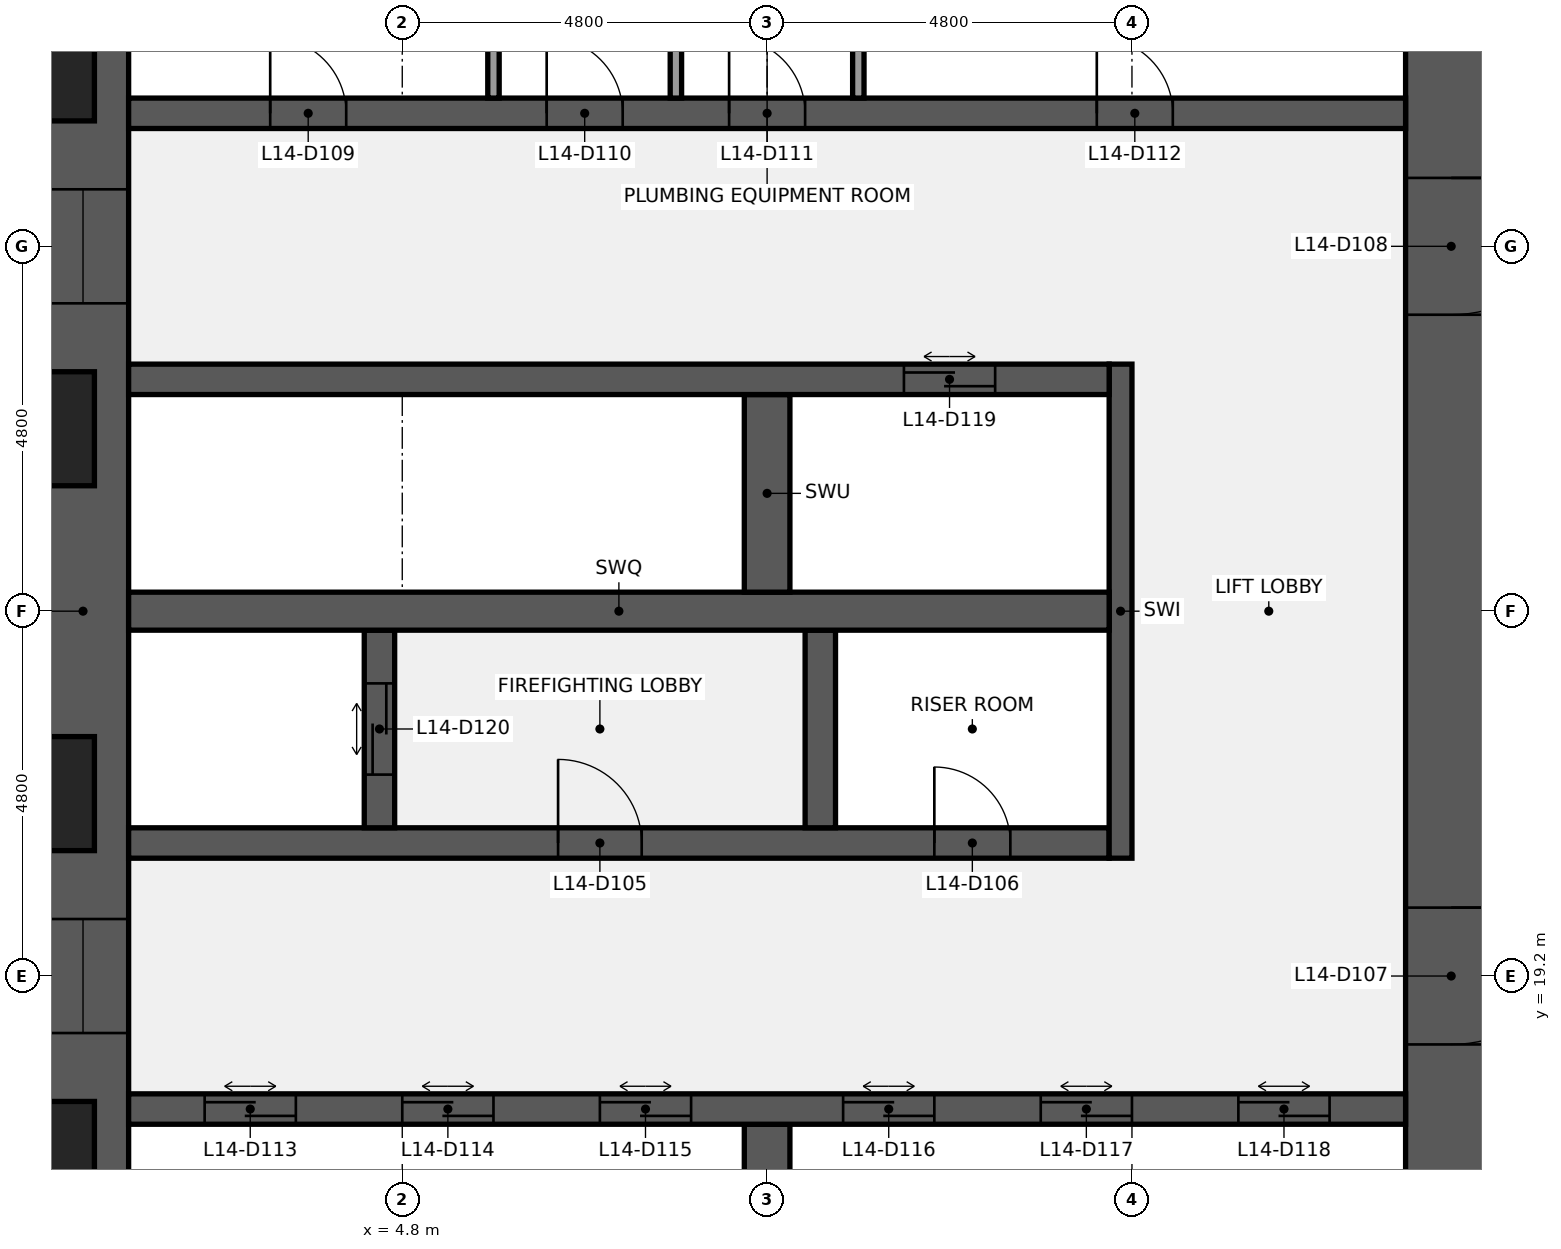
"""IFC4 building model, lengths in metres.
Left out: names, types, materials, properties, quantities, classifications, styles, units other than length and angle.
Written with IfcOpenShell. Run it as: python <this file> out.ifc"""

import sys

from ifc_helpers import new_model, si_unit, direction, frame, frame_2d, origin, place, context, subcontext, project, spatial, rectangle, extrude, element, fill, save


model = new_model("IFC4")
c1 = context("Model", 3, precision=1e-05, world=origin(), true_north=direction((0.0, 1.0)))
c2 = subcontext(c1, "Body", "Model", "MODEL_VIEW")
j1 = project(units=[si_unit("LENGTHUNIT", "METRE"), si_unit("PLANEANGLEUNIT", "RADIAN")], contexts=[c1])
p1 = place(None, origin())
s1 = spatial("IfcSite", under=j1, at=p1, CompositionType="ELEMENT")
p2 = place(p1, origin())
s2 = spatial("IfcBuilding", under=s1, at=p2, CompositionType="ELEMENT")
p3 = place(p2, frame((0.0, 0.0, 67.0)))
s3 = spatial("IfcBuildingStorey", under=s2, at=p3, CompositionType="ELEMENT", Elevation=67.0)
p4 = place(p3, frame((0.6, 9.6, 0.0), z_axis=(0.0, 0.0, 1.0), x_axis=(0.0, 1.0, 0.0)))
e1 = element("IfcWall", 1, at=p4, inside=s3, PredefinedType="SHEAR", context=c2, shape_type="SweptSolid", body=[
    extrude(rectangle(XDim=28.8, YDim=1.2, at=frame_2d((14.4, 0.0))), origin(), (0.0, 0.0, 1.0), 3.84),
])
p5 = place(p4, frame((8.85, 0.0, 0.9)))
e2 = element("IfcOpeningElement", 2, at=p5, cuts=e1, PredefinedType="OPENING", context=c2, shape_type="SweptSolid", body=[
    extrude(rectangle(XDim=1.5, YDim=1.5, at=frame_2d((0.75, 0.75))), frame((0.0, 0.61, 0.0), z_axis=(0.0, -1.0, 0.0), x_axis=(1.0, 0.0, 0.0)), (0.0, 0.0, 1.0), 1.22),
])
p6 = place(p4, frame((18.45, 0.0, 0.9)))
e3 = element("IfcOpeningElement", 3, at=p6, cuts=e1, PredefinedType="OPENING", context=c2, shape_type="SweptSolid", body=[
    extrude(rectangle(XDim=1.5, YDim=1.5, at=frame_2d((0.75, 0.75))), frame((0.0, 0.61, 0.0), z_axis=(0.0, -1.0, 0.0), x_axis=(1.0, 0.0, 0.0)), (0.0, 0.0, 1.0), 1.22),
])
p7 = place(p3, frame((18.6, 38.4, 0.0), z_axis=(0.0, 0.0, 1.0), x_axis=(0.0, -1.0, 0.0)))
e4 = element("IfcWall", 4, at=p7, inside=s3, PredefinedType="SHEAR", context=c2, shape_type="SweptSolid", body=[
    extrude(rectangle(XDim=28.8, YDim=1.2, at=frame_2d((14.4, 0.0))), origin(), (0.0, 0.0, 1.0), 3.84),
])
p8 = place(p7, frame((18.3, 0.0, 0.0)))
e5 = element("IfcOpeningElement", 5, at=p8, cuts=e4, PredefinedType="OPENING", context=c2, shape_type="SweptSolid", body=[
    extrude(rectangle(XDim=1.8, YDim=2.1, at=frame_2d((0.9, 1.05))), frame((0.0, 0.61, 0.0), z_axis=(0.0, -1.0, 0.0), x_axis=(1.0, 0.0, 0.0)), (0.0, 0.0, 1.0), 1.22),
])
p9 = place(p7, frame((8.7, 0.0, 0.0)))
e6 = element("IfcOpeningElement", 6, at=p9, cuts=e4, PredefinedType="OPENING", context=c2, shape_type="SweptSolid", body=[
    extrude(rectangle(XDim=1.8, YDim=2.1, at=frame_2d((0.9, 1.05))), frame((0.0, 0.61, 0.0), z_axis=(0.0, -1.0, 0.0), x_axis=(1.0, 0.0, 0.0)), (0.0, 0.0, 1.0), 1.22),
])
p10 = place(p3, frame((9.6, 14.65, 0.0), z_axis=(0.0, 0.0, 1.0), x_axis=(0.0, 1.0, 0.0)))
e7 = element("IfcWall", 7, at=p10, inside=s3, PredefinedType="SHEAR", context=c2, shape_type="SweptSolid", body=[
    extrude(rectangle(XDim=2.6, YDim=0.6, at=frame_2d((1.3, 0.0))), origin(), (0.0, 0.0, 1.0), 3.84),
])
p11 = place(p3, frame((1.2, 17.45, 0.0), z_axis=(0.0, 0.0, 1.0), x_axis=(1.0, 0.0, 0.0)))
e8 = element("IfcWall", 8, at=p11, inside=s3, PredefinedType="SHEAR", context=c2, shape_type="SweptSolid", body=[
    extrude(rectangle(XDim=16.8, YDim=0.4, at=frame_2d((8.4, 0.0))), origin(), (0.0, 0.0, 1.0), 3.84),
])
p12 = place(p11, frame((1.0, 0.0, 0.0)))
e9 = element("IfcOpeningElement", 9, at=p12, cuts=e8, PredefinedType="OPENING", context=c2, shape_type="SweptSolid", body=[
    extrude(rectangle(XDim=1.2, YDim=2.1, at=frame_2d((0.6, 1.05))), frame((0.0, 0.21, 0.0), z_axis=(0.0, -1.0, 0.0), x_axis=(1.0, 0.0, 0.0)), (0.0, 0.0, 1.0), 0.42),
])
p13 = place(p11, frame((3.6, 0.0, 0.0)))
e10 = element("IfcOpeningElement", 10, at=p13, cuts=e8, PredefinedType="OPENING", context=c2, shape_type="SweptSolid", body=[
    extrude(rectangle(XDim=1.2, YDim=2.1, at=frame_2d((0.6, 1.05))), frame((0.0, 0.21, 0.0), z_axis=(0.0, -1.0, 0.0), x_axis=(1.0, 0.0, 0.0)), (0.0, 0.0, 1.0), 0.42),
])
p14 = place(p11, frame((6.2, 0.0, 0.0)))
e11 = element("IfcOpeningElement", 11, at=p14, cuts=e8, PredefinedType="OPENING", context=c2, shape_type="SweptSolid", body=[
    extrude(rectangle(XDim=1.2, YDim=2.1, at=frame_2d((0.6, 1.05))), frame((0.0, 0.21, 0.0), z_axis=(0.0, -1.0, 0.0), x_axis=(1.0, 0.0, 0.0)), (0.0, 0.0, 1.0), 0.42),
])
p15 = place(p11, frame((9.4, 0.0, 0.0)))
e12 = element("IfcOpeningElement", 12, at=p15, cuts=e8, PredefinedType="OPENING", context=c2, shape_type="SweptSolid", body=[
    extrude(rectangle(XDim=1.2, YDim=2.1, at=frame_2d((0.6, 1.05))), frame((0.0, 0.21, 0.0), z_axis=(0.0, -1.0, 0.0), x_axis=(1.0, 0.0, 0.0)), (0.0, 0.0, 1.0), 0.42),
])
p16 = place(p11, frame((12.0, 0.0, 0.0)))
e13 = element("IfcOpeningElement", 13, at=p16, cuts=e8, PredefinedType="OPENING", context=c2, shape_type="SweptSolid", body=[
    extrude(rectangle(XDim=1.2, YDim=2.1, at=frame_2d((0.6, 1.05))), frame((0.0, 0.21, 0.0), z_axis=(0.0, -1.0, 0.0), x_axis=(1.0, 0.0, 0.0)), (0.0, 0.0, 1.0), 0.42),
])
p17 = place(p11, frame((14.6, 0.0, 0.0)))
e14 = element("IfcOpeningElement", 14, at=p17, cuts=e8, PredefinedType="OPENING", context=c2, shape_type="SweptSolid", body=[
    extrude(rectangle(XDim=1.2, YDim=2.1, at=frame_2d((0.6, 1.05))), frame((0.0, 0.21, 0.0), z_axis=(0.0, -1.0, 0.0), x_axis=(1.0, 0.0, 0.0)), (0.0, 0.0, 1.0), 0.42),
])
p18 = place(p3, frame((1.2, 20.95, 0.0), z_axis=(0.0, 0.0, 1.0), x_axis=(1.0, 0.0, 0.0)))
e15 = element("IfcWall", 15, at=p18, inside=s3, PredefinedType="SHEAR", context=c2, shape_type="SweptSolid", body=[
    extrude(rectangle(XDim=12.9, YDim=0.4, at=frame_2d((6.45, 0.0))), origin(), (0.0, 0.0, 1.0), 3.84),
])
p19 = place(p18, frame((5.65, 0.0, 0.0)))
e16 = element("IfcOpeningElement", 16, at=p19, cuts=e15, PredefinedType="OPENING", context=c2, shape_type="SweptSolid", body=[
    extrude(rectangle(XDim=1.1, YDim=2.1, at=frame_2d((0.55, 1.05))), frame((0.0, 0.21, 0.0), z_axis=(0.0, -1.0, 0.0), x_axis=(1.0, 0.0, 0.0)), (0.0, 0.0, 1.0), 0.42),
])
p20 = place(p18, frame((10.6, 0.0, 0.0)))
e17 = element("IfcOpeningElement", 17, at=p20, cuts=e15, PredefinedType="OPENING", context=c2, shape_type="SweptSolid", body=[
    extrude(rectangle(XDim=1.0, YDim=2.1, at=frame_2d((0.5, 1.05))), frame((0.0, 0.21, 0.0), z_axis=(0.0, -1.0, 0.0), x_axis=(1.0, 0.0, 0.0)), (0.0, 0.0, 1.0), 0.42),
])
p21 = place(p3, frame((14.25, 20.75, 0.0), z_axis=(0.0, 0.0, 1.0), x_axis=(0.0, 1.0, 0.0)))
e18 = element("IfcWall", 18, at=p21, inside=s3, PredefinedType="SHEAR", context=c2, shape_type="SweptSolid", body=[
    extrude(rectangle(XDim=6.5, YDim=0.3, at=frame_2d((3.25, 0.0))), origin(), (0.0, 0.0, 1.0), 3.84),
])
p22 = place(p3, frame((4.5, 21.15, 0.0), z_axis=(0.0, 0.0, 1.0), x_axis=(0.0, 1.0, 0.0)))
e19 = element("IfcWall", 19, at=p22, inside=s3, PredefinedType="SHEAR", context=c2, shape_type="SweptSolid", body=[
    extrude(rectangle(XDim=2.6, YDim=0.4, at=frame_2d((1.3, 0.0))), origin(), (0.0, 0.0, 1.0), 3.84),
])
p23 = place(p22, frame((0.7, 0.0, 0.0)))
e20 = element("IfcOpeningElement", 20, at=p23, cuts=e19, PredefinedType="OPENING", context=c2, shape_type="SweptSolid", body=[
    extrude(rectangle(XDim=1.2, YDim=2.1, at=frame_2d((0.6, 1.05))), frame((0.0, 0.21, 0.0), z_axis=(0.0, -1.0, 0.0), x_axis=(1.0, 0.0, 0.0)), (0.0, 0.0, 1.0), 0.42),
])
p24 = place(p3, frame((10.3, 21.15, 0.0), z_axis=(0.0, 0.0, 1.0), x_axis=(0.0, 1.0, 0.0)))
e21 = element("IfcWall", 21, at=p24, inside=s3, PredefinedType="SHEAR", context=c2, shape_type="SweptSolid", body=[
    extrude(rectangle(XDim=2.6, YDim=0.4, at=frame_2d((1.3, 0.0))), origin(), (0.0, 0.0, 1.0), 3.84),
])
p25 = place(p3, frame((1.2, 24.0, 0.0), z_axis=(0.0, 0.0, 1.0), x_axis=(1.0, 0.0, 0.0)))
e22 = element("IfcWall", 22, at=p25, inside=s3, PredefinedType="SHEAR", context=c2, shape_type="SweptSolid", body=[
    extrude(rectangle(XDim=12.9, YDim=0.5, at=frame_2d((6.45, 0.0))), origin(), (0.0, 0.0, 1.0), 3.84),
])
p26 = place(p3, frame((9.6, 24.25, 0.0), z_axis=(0.0, 0.0, 1.0), x_axis=(0.0, 1.0, 0.0)))
e23 = element("IfcWall", 23, at=p26, inside=s3, PredefinedType="SHEAR", context=c2, shape_type="SweptSolid", body=[
    extrude(rectangle(XDim=2.6, YDim=0.6, at=frame_2d((1.3, 0.0))), origin(), (0.0, 0.0, 1.0), 3.84),
])
p27 = place(p3, frame((1.2, 27.05, 0.0), z_axis=(0.0, 0.0, 1.0), x_axis=(1.0, 0.0, 0.0)))
e24 = element("IfcWall", 24, at=p27, inside=s3, PredefinedType="SHEAR", context=c2, shape_type="SweptSolid", body=[
    extrude(rectangle(XDim=12.9, YDim=0.4, at=frame_2d((6.45, 0.0))), origin(), (0.0, 0.0, 1.0), 3.84),
])
p28 = place(p27, frame((10.2, 0.0, 0.0)))
e25 = element("IfcOpeningElement", 25, at=p28, cuts=e24, PredefinedType="OPENING", context=c2, shape_type="SweptSolid", body=[
    extrude(rectangle(XDim=1.2, YDim=2.1, at=frame_2d((0.6, 1.05))), frame((0.0, 0.21, 0.0), z_axis=(0.0, -1.0, 0.0), x_axis=(1.0, 0.0, 0.0)), (0.0, 0.0, 1.0), 0.42),
])
p29 = place(p3, frame((1.2, 30.55, 0.0), z_axis=(0.0, 0.0, 1.0), x_axis=(1.0, 0.0, 0.0)))
e26 = element("IfcWall", 26, at=p29, inside=s3, PredefinedType="SHEAR", context=c2, shape_type="SweptSolid", body=[
    extrude(rectangle(XDim=16.8, YDim=0.4, at=frame_2d((8.4, 0.0))), origin(), (0.0, 0.0, 1.0), 3.84),
])
p30 = place(p29, frame((1.863, 0.0, 0.0)))
e27 = element("IfcOpeningElement", 27, at=p30, cuts=e26, PredefinedType="OPENING", context=c2, shape_type="SweptSolid", body=[
    extrude(rectangle(XDim=1.0, YDim=2.1, at=frame_2d((0.5, 1.05))), frame((0.0, 0.21, 0.0), z_axis=(0.0, -1.0, 0.0), x_axis=(1.0, 0.0, 0.0)), (0.0, 0.0, 1.0), 0.42),
])
p31 = place(p29, frame((5.5, 0.0, 0.0)))
e28 = element("IfcOpeningElement", 28, at=p31, cuts=e26, PredefinedType="OPENING", context=c2, shape_type="SweptSolid", body=[
    extrude(rectangle(XDim=1.0, YDim=2.1, at=frame_2d((0.5, 1.05))), frame((0.0, 0.21, 0.0), z_axis=(0.0, -1.0, 0.0), x_axis=(1.0, 0.0, 0.0)), (0.0, 0.0, 1.0), 0.42),
])
p32 = place(p29, frame((7.9, 0.0, 0.0)))
e29 = element("IfcOpeningElement", 29, at=p32, cuts=e26, PredefinedType="OPENING", context=c2, shape_type="SweptSolid", body=[
    extrude(rectangle(XDim=1.0, YDim=2.1, at=frame_2d((0.5, 1.05))), frame((0.0, 0.21, 0.0), z_axis=(0.0, -1.0, 0.0), x_axis=(1.0, 0.0, 0.0)), (0.0, 0.0, 1.0), 0.42),
])
p33 = place(p29, frame((12.738, 0.0, 0.0)))
e30 = element("IfcOpeningElement", 30, at=p33, cuts=e26, PredefinedType="OPENING", context=c2, shape_type="SweptSolid", body=[
    extrude(rectangle(XDim=1.0, YDim=2.1, at=frame_2d((0.5, 1.05))), frame((0.0, 0.21, 0.0), z_axis=(0.0, -1.0, 0.0), x_axis=(1.0, 0.0, 0.0)), (0.0, 0.0, 1.0), 0.42),
])
for number, where, z_axis, x_axis in (
    (31, (6.0, 30.75, 0.0), (0.0, 0.0, 1.0), (0.0, 1.0, 0.0)),
    (32, (8.4, 30.75, 0.0), (0.0, 0.0, 1.0), (0.0, 1.0, 0.0)),
    (33, (10.8, 30.75, 0.0), (0.0, 0.0, 1.0), (0.0, 1.0, 0.0)),
):
    element("IfcWall", number, at=place(p3, frame(where, z_axis=z_axis, x_axis=x_axis)), inside=s3, PredefinedType="PARTITIONING", context=c2, shape_type="SweptSolid", body=[
        extrude(rectangle(XDim=2.6, YDim=0.15, at=frame_2d((1.3, 0.0))), origin(), (0.0, 0.0, 1.0), 3.84),
    ])
p34 = place(p19, origin())
e34 = element("IfcDoor", 34, at=p34, inside=s3, OperationType="SINGLE_SWING_LEFT", PredefinedType="DOOR", context=c2, shape_type="SweptSolid", body=[
    extrude(rectangle(XDim=1.1, YDim=2.1, at=frame_2d((0.55, 1.05))), frame((0.0, 0.025, 0.0), z_axis=(0.0, -1.0, 0.0), x_axis=(1.0, 0.0, 0.0)), (0.0, 0.0, 1.0), 0.05),
])
fill(e16, e34)
p35 = place(p20, origin())
e35 = element("IfcDoor", 35, at=p35, inside=s3, OperationType="SINGLE_SWING_LEFT", PredefinedType="DOOR", context=c2, shape_type="SweptSolid", body=[
    extrude(rectangle(XDim=1.0, YDim=2.1, at=frame_2d((0.5, 1.05))), frame((0.0, 0.025, 0.0), z_axis=(0.0, -1.0, 0.0), x_axis=(1.0, 0.0, 0.0)), (0.0, 0.0, 1.0), 0.05),
])
fill(e17, e35)
p36 = place(p8, origin())
e36 = element("IfcDoor", 36, at=p36, inside=s3, OperationType="DOUBLE_DOOR_SINGLE_SWING", PredefinedType="DOOR", context=c2, shape_type="SweptSolid", body=[
    extrude(rectangle(XDim=1.8, YDim=2.1, at=frame_2d((0.9, 1.05))), frame((0.0, 0.025, 0.0), z_axis=(0.0, -1.0, 0.0), x_axis=(1.0, 0.0, 0.0)), (0.0, 0.0, 1.0), 0.05),
])
fill(e5, e36)
p37 = place(p9, origin())
e37 = element("IfcDoor", 37, at=p37, inside=s3, OperationType="DOUBLE_DOOR_SINGLE_SWING", PredefinedType="DOOR", context=c2, shape_type="SweptSolid", body=[
    extrude(rectangle(XDim=1.8, YDim=2.1, at=frame_2d((0.9, 1.05))), frame((0.0, 0.025, 0.0), z_axis=(0.0, -1.0, 0.0), x_axis=(1.0, 0.0, 0.0)), (0.0, 0.0, 1.0), 0.05),
])
fill(e6, e37)
p38 = place(p30, origin())
e38 = element("IfcDoor", 38, at=p38, inside=s3, OperationType="SINGLE_SWING_LEFT", PredefinedType="DOOR", context=c2, shape_type="SweptSolid", body=[
    extrude(rectangle(XDim=1.0, YDim=2.1, at=frame_2d((0.5, 1.05))), frame((0.0, 0.025, 0.0), z_axis=(0.0, -1.0, 0.0), x_axis=(1.0, 0.0, 0.0)), (0.0, 0.0, 1.0), 0.05),
])
fill(e27, e38)
p39 = place(p31, origin())
e39 = element("IfcDoor", 39, at=p39, inside=s3, OperationType="SINGLE_SWING_LEFT", PredefinedType="DOOR", context=c2, shape_type="SweptSolid", body=[
    extrude(rectangle(XDim=1.0, YDim=2.1, at=frame_2d((0.5, 1.05))), frame((0.0, 0.025, 0.0), z_axis=(0.0, -1.0, 0.0), x_axis=(1.0, 0.0, 0.0)), (0.0, 0.0, 1.0), 0.05),
])
fill(e28, e39)
p40 = place(p32, origin())
e40 = element("IfcDoor", 40, at=p40, inside=s3, OperationType="SINGLE_SWING_LEFT", PredefinedType="DOOR", context=c2, shape_type="SweptSolid", body=[
    extrude(rectangle(XDim=1.0, YDim=2.1, at=frame_2d((0.5, 1.05))), frame((0.0, 0.025, 0.0), z_axis=(0.0, -1.0, 0.0), x_axis=(1.0, 0.0, 0.0)), (0.0, 0.0, 1.0), 0.05),
])
fill(e29, e40)
p41 = place(p33, origin())
e41 = element("IfcDoor", 41, at=p41, inside=s3, OperationType="SINGLE_SWING_LEFT", PredefinedType="DOOR", context=c2, shape_type="SweptSolid", body=[
    extrude(rectangle(XDim=1.0, YDim=2.1, at=frame_2d((0.5, 1.05))), frame((0.0, 0.025, 0.0), z_axis=(0.0, -1.0, 0.0), x_axis=(1.0, 0.0, 0.0)), (0.0, 0.0, 1.0), 0.05),
])
fill(e30, e41)
p42 = place(p12, origin())
e42 = element("IfcDoor", 42, at=p42, inside=s3, OperationType="DOUBLE_DOOR_SLIDING", PredefinedType="DOOR", context=c2, shape_type="SweptSolid", body=[
    extrude(rectangle(XDim=1.2, YDim=2.1, at=frame_2d((0.6, 1.05))), frame((0.0, 0.025, 0.0), z_axis=(0.0, -1.0, 0.0), x_axis=(1.0, 0.0, 0.0)), (0.0, 0.0, 1.0), 0.05),
])
fill(e9, e42)
p43 = place(p13, origin())
e43 = element("IfcDoor", 43, at=p43, inside=s3, OperationType="DOUBLE_DOOR_SLIDING", PredefinedType="DOOR", context=c2, shape_type="SweptSolid", body=[
    extrude(rectangle(XDim=1.2, YDim=2.1, at=frame_2d((0.6, 1.05))), frame((0.0, 0.025, 0.0), z_axis=(0.0, -1.0, 0.0), x_axis=(1.0, 0.0, 0.0)), (0.0, 0.0, 1.0), 0.05),
])
fill(e10, e43)
p44 = place(p14, origin())
e44 = element("IfcDoor", 44, at=p44, inside=s3, OperationType="DOUBLE_DOOR_SLIDING", PredefinedType="DOOR", context=c2, shape_type="SweptSolid", body=[
    extrude(rectangle(XDim=1.2, YDim=2.1, at=frame_2d((0.6, 1.05))), frame((0.0, 0.025, 0.0), z_axis=(0.0, -1.0, 0.0), x_axis=(1.0, 0.0, 0.0)), (0.0, 0.0, 1.0), 0.05),
])
fill(e11, e44)
p45 = place(p15, origin())
e45 = element("IfcDoor", 45, at=p45, inside=s3, OperationType="DOUBLE_DOOR_SLIDING", PredefinedType="DOOR", context=c2, shape_type="SweptSolid", body=[
    extrude(rectangle(XDim=1.2, YDim=2.1, at=frame_2d((0.6, 1.05))), frame((0.0, 0.025, 0.0), z_axis=(0.0, -1.0, 0.0), x_axis=(1.0, 0.0, 0.0)), (0.0, 0.0, 1.0), 0.05),
])
fill(e12, e45)
p46 = place(p16, origin())
e46 = element("IfcDoor", 46, at=p46, inside=s3, OperationType="DOUBLE_DOOR_SLIDING", PredefinedType="DOOR", context=c2, shape_type="SweptSolid", body=[
    extrude(rectangle(XDim=1.2, YDim=2.1, at=frame_2d((0.6, 1.05))), frame((0.0, 0.025, 0.0), z_axis=(0.0, -1.0, 0.0), x_axis=(1.0, 0.0, 0.0)), (0.0, 0.0, 1.0), 0.05),
])
fill(e13, e46)
p47 = place(p17, origin())
e47 = element("IfcDoor", 47, at=p47, inside=s3, OperationType="DOUBLE_DOOR_SLIDING", PredefinedType="DOOR", context=c2, shape_type="SweptSolid", body=[
    extrude(rectangle(XDim=1.2, YDim=2.1, at=frame_2d((0.6, 1.05))), frame((0.0, 0.025, 0.0), z_axis=(0.0, -1.0, 0.0), x_axis=(1.0, 0.0, 0.0)), (0.0, 0.0, 1.0), 0.05),
])
fill(e14, e47)
p48 = place(p28, origin())
e48 = element("IfcDoor", 48, at=p48, inside=s3, OperationType="DOUBLE_DOOR_SLIDING", PredefinedType="DOOR", context=c2, shape_type="SweptSolid", body=[
    extrude(rectangle(XDim=1.2, YDim=2.1, at=frame_2d((0.6, 1.05))), frame((0.0, 0.025, 0.0), z_axis=(0.0, -1.0, 0.0), x_axis=(1.0, 0.0, 0.0)), (0.0, 0.0, 1.0), 0.05),
])
fill(e25, e48)
p49 = place(p23, origin())
e49 = element("IfcDoor", 49, at=p49, inside=s3, OperationType="DOUBLE_DOOR_SLIDING", PredefinedType="DOOR", context=c2, shape_type="SweptSolid", body=[
    extrude(rectangle(XDim=1.2, YDim=2.1, at=frame_2d((0.6, 1.05))), frame((0.0, 0.025, 0.0), z_axis=(0.0, -1.0, 0.0), x_axis=(1.0, 0.0, 0.0)), (0.0, 0.0, 1.0), 0.05),
])
fill(e20, e49)
p50 = place(p5, origin())
e50 = element("IfcWindow", 50, at=p50, inside=s3, PartitioningType="SINGLE_PANEL", PredefinedType="WINDOW", context=c2, shape_type="SweptSolid", body=[
    extrude(rectangle(XDim=1.5, YDim=1.5, at=frame_2d((0.75, 0.75))), frame((0.0, 0.03, 0.0), z_axis=(0.0, -1.0, 0.0), x_axis=(1.0, 0.0, 0.0)), (0.0, 0.0, 1.0), 0.06),
])
fill(e2, e50)
p51 = place(p6, origin())
e51 = element("IfcWindow", 51, at=p51, inside=s3, PartitioningType="SINGLE_PANEL", PredefinedType="WINDOW", context=c2, shape_type="SweptSolid", body=[
    extrude(rectangle(XDim=1.5, YDim=1.5, at=frame_2d((0.75, 0.75))), frame((0.0, 0.03, 0.0), z_axis=(0.0, -1.0, 0.0), x_axis=(1.0, 0.0, 0.0)), (0.0, 0.0, 1.0), 0.06),
])
fill(e3, e51)
save(model, sys.argv[1])
